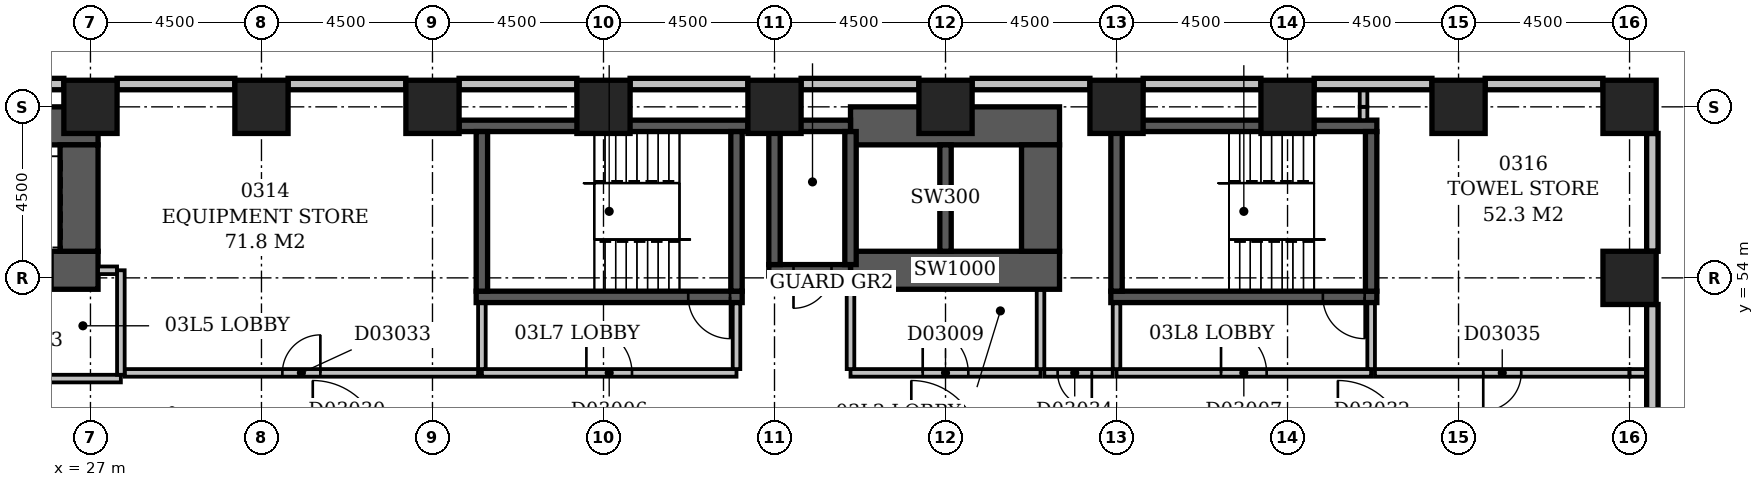
"""IFC4 building model, lengths in metres.
Left out: names, types, materials, properties, quantities, classifications, styles, units other than length and angle.
Written with IfcOpenShell. Run it as: python <this file> out.ifc"""

import sys

from ifc_helpers import new_model, si_unit, direction, frame, frame_2d, origin, origin_2d, place, context, subcontext, project, spatial, rectangle, extrude, element, fill, save


model = new_model("IFC4")
c1 = context("Model", 3, precision=1e-05, world=origin(), true_north=direction((0.0, 1.0)))
c2 = subcontext(c1, "Body", "Model", "MODEL_VIEW")
j1 = project(units=[si_unit("LENGTHUNIT", "METRE"), si_unit("PLANEANGLEUNIT", "RADIAN")], contexts=[c1])
p1 = place(None, origin())
s1 = spatial("IfcSite", under=j1, at=p1, CompositionType="ELEMENT")
p2 = place(p1, origin())
s2 = spatial("IfcBuilding", under=s1, at=p2, CompositionType="ELEMENT")
p3 = place(p2, frame((0.0, 0.0, 19.0)))
s3 = spatial("IfcBuildingStorey", under=s2, at=p3, CompositionType="ELEMENT", Elevation=19.0)
p4 = place(p3, frame((23.7, 54.2, -0.4), z_axis=(0.0, 0.0, 1.0), x_axis=(1.0, 0.0, 0.0)))
e1 = element("IfcWall", 1, at=p4, inside=s3, PredefinedType="SHEAR", context=c2, shape_type="SweptSolid", body=[
    extrude(rectangle(XDim=3.5, YDim=1.0, at=frame_2d((1.75, 0.0))), origin(), (0.0, 0.0, 1.0), 4.95),
])
p5 = place(p4, frame((1.2, 0.0, 0.4)))
e2 = element("IfcOpeningElement", 2, at=p5, cuts=e1, PredefinedType="OPENING", context=c2, shape_type="SweptSolid", body=[
    extrude(rectangle(XDim=1.1, YDim=2.1, at=frame_2d((0.55, 1.05))), frame((0.0, 0.512, 0.0), z_axis=(0.0, -1.0, 0.0), x_axis=(1.0, 0.0, 0.0)), (0.0, 0.0, 1.0), 1.024),
])
p6 = place(p3, frame((23.7, 58.0, -0.4), z_axis=(0.0, 0.0, 1.0), x_axis=(1.0, 0.0, 0.0)))
e3 = element("IfcWall", 3, at=p6, inside=s3, PredefinedType="SHEAR", context=c2, shape_type="SweptSolid", body=[
    extrude(rectangle(XDim=3.5, YDim=1.0, at=frame_2d((1.75, 0.0))), origin(), (0.0, 0.0, 1.0), 4.95),
])
p7 = place(p3, frame((26.7, 54.7, -0.4), z_axis=(0.0, 0.0, 1.0), x_axis=(0.0, 1.0, 0.0)))
e4 = element("IfcWall", 4, at=p7, inside=s3, PredefinedType="SHEAR", context=c2, shape_type="SweptSolid", body=[
    extrude(rectangle(XDim=2.8, YDim=1.0, at=frame_2d((1.4, 0.0))), origin(), (0.0, 0.0, 1.0), 4.95),
])
p8 = place(p3, frame((36.7, 58.0, -0.4), z_axis=(0.0, 0.0, 1.0), x_axis=(1.0, 0.0, 0.0)))
e5 = element("IfcWall", 5, at=p8, inside=s3, PredefinedType="SHEAR", context=c2, shape_type="SweptSolid", body=[
    extrude(rectangle(XDim=7.6, YDim=0.3, at=frame_2d((3.8, 0.0))), origin(), (0.0, 0.0, 1.0), 4.95),
])
p9 = place(p3, frame((37.15, 53.5, -0.4), z_axis=(0.0, 0.0, 1.0), x_axis=(1.0, 0.0, 0.0)))
e6 = element("IfcWall", 6, at=p9, inside=s3, PredefinedType="SHEAR", context=c2, shape_type="SweptSolid", body=[
    extrude(rectangle(XDim=7.0, YDim=0.3, at=frame_2d((3.5, 0.0))), origin(), (0.0, 0.0, 1.0), 4.95),
])
p10 = place(p9, frame((5.58, 0.0, 0.4)))
e7 = element("IfcOpeningElement", 7, at=p10, cuts=e6, PredefinedType="OPENING", context=c2, shape_type="SweptSolid", body=[
    extrude(rectangle(XDim=1.1, YDim=2.1, at=frame_2d((0.55, 1.05))), frame((0.0, 0.162, 0.0), z_axis=(0.0, -1.0, 0.0), x_axis=(1.0, 0.0, 0.0)), (0.0, 0.0, 1.0), 0.324),
])
for number, where, z_axis, x_axis in (
    (8, (37.3, 53.65, -0.4), (0.0, 0.0, 1.0), (0.0, 1.0, 0.0)),
    (9, (44.0, 53.65, -0.4), (0.0, 0.0, 1.0), (0.0, 1.0, 0.0)),
):
    element("IfcWall", number, at=place(p3, frame(where, z_axis=z_axis, x_axis=x_axis)), inside=s3, PredefinedType="SHEAR", context=c2, shape_type="SweptSolid", body=[
        extrude(rectangle(XDim=4.2, YDim=0.3, at=frame_2d((2.1, 0.0))), origin(), (0.0, 0.0, 1.0), 4.95),
    ])
p11 = place(p3, frame((44.85, 54.2, -0.4), z_axis=(0.0, 0.0, 1.0), x_axis=(1.0, 0.0, 0.0)))
e10 = element("IfcWall", 10, at=p11, inside=s3, PredefinedType="SHEAR", context=c2, shape_type="SweptSolid", body=[
    extrude(rectangle(XDim=2.15, YDim=0.3, at=frame_2d((1.075, 0.0))), origin(), (0.0, 0.0, 1.0), 4.95),
])
p12 = place(p11, frame((0.65, 0.0, 0.4)))
e11 = element("IfcOpeningElement", 11, at=p12, cuts=e10, PredefinedType="OPENING", context=c2, shape_type="SweptSolid", body=[
    extrude(rectangle(XDim=1.0, YDim=2.1, at=frame_2d((0.5, 1.05))), frame((0.0, 0.162, 0.0), z_axis=(0.0, -1.0, 0.0), x_axis=(1.0, 0.0, 0.0)), (0.0, 0.0, 1.0), 0.324),
])
p13 = place(p3, frame((44.85, 58.0, -0.4), z_axis=(0.0, 0.0, 1.0), x_axis=(1.0, 0.0, 0.0)))
e12 = element("IfcWall", 12, at=p13, inside=s3, PredefinedType="SHEAR", context=c2, shape_type="SweptSolid", body=[
    extrude(rectangle(XDim=2.15, YDim=0.3, at=frame_2d((1.075, 0.0))), origin(), (0.0, 0.0, 1.0), 4.95),
])
p14 = place(p3, frame((45.0, 54.35, -0.4), z_axis=(0.0, 0.0, 1.0), x_axis=(0.0, 1.0, 0.0)))
e13 = element("IfcWall", 13, at=p14, inside=s3, PredefinedType="SHEAR", context=c2, shape_type="SweptSolid", body=[
    extrude(rectangle(XDim=3.5, YDim=0.3, at=frame_2d((1.75, 0.0))), origin(), (0.0, 0.0, 1.0), 4.95),
])
p15 = place(p3, frame((47.0, 54.2, -0.4), z_axis=(0.0, 0.0, 1.0), x_axis=(1.0, 0.0, 0.0)))
e14 = element("IfcWall", 14, at=p15, inside=s3, PredefinedType="SHEAR", context=c2, shape_type="SweptSolid", body=[
    extrude(rectangle(XDim=5.5, YDim=1.0, at=frame_2d((2.75, 0.0))), origin(), (0.0, 0.0, 1.0), 4.95),
])
p16 = place(p3, frame((47.0, 54.35, -0.4), z_axis=(0.0, 0.0, 1.0), x_axis=(0.0, 1.0, 0.0)))
e15 = element("IfcWall", 15, at=p16, inside=s3, PredefinedType="SHEAR", context=c2, shape_type="SweptSolid", body=[
    extrude(rectangle(XDim=3.5, YDim=0.3, at=frame_2d((1.75, 0.0))), origin(), (0.0, 0.0, 1.0), 4.95),
])
p17 = place(p3, frame((47.0, 58.0, -0.4), z_axis=(0.0, 0.0, 1.0), x_axis=(1.0, 0.0, 0.0)))
e16 = element("IfcWall", 16, at=p17, inside=s3, PredefinedType="SHEAR", context=c2, shape_type="SweptSolid", body=[
    extrude(rectangle(XDim=5.5, YDim=1.0, at=frame_2d((2.75, 0.0))), origin(), (0.0, 0.0, 1.0), 4.95),
])
p18 = place(p3, frame((49.5, 54.7, -0.4), z_axis=(0.0, 0.0, 1.0), x_axis=(0.0, 1.0, 0.0)))
e17 = element("IfcWall", 17, at=p18, inside=s3, PredefinedType="SHEAR", context=c2, shape_type="SweptSolid", body=[
    extrude(rectangle(XDim=2.8, YDim=0.3, at=frame_2d((1.4, 0.0))), origin(), (0.0, 0.0, 1.0), 4.95),
])
p19 = place(p3, frame((52.0, 54.7, -0.4), z_axis=(0.0, 0.0, 1.0), x_axis=(0.0, 1.0, 0.0)))
e18 = element("IfcWall", 18, at=p19, inside=s3, PredefinedType="SHEAR", context=c2, shape_type="SweptSolid", body=[
    extrude(rectangle(XDim=2.8, YDim=1.0, at=frame_2d((1.4, 0.0))), origin(), (0.0, 0.0, 1.0), 4.95),
])
p20 = place(p3, frame((53.85, 53.5, -0.4), z_axis=(0.0, 0.0, 1.0), x_axis=(1.0, 0.0, 0.0)))
e19 = element("IfcWall", 19, at=p20, inside=s3, PredefinedType="SHEAR", context=c2, shape_type="SweptSolid", body=[
    extrude(rectangle(XDim=7.0, YDim=0.3, at=frame_2d((3.5, 0.0))), origin(), (0.0, 0.0, 1.0), 4.95),
])
p21 = place(p20, frame((5.58, 0.0, 0.4)))
e20 = element("IfcOpeningElement", 20, at=p21, cuts=e19, PredefinedType="OPENING", context=c2, shape_type="SweptSolid", body=[
    extrude(rectangle(XDim=1.1, YDim=2.1, at=frame_2d((0.55, 1.05))), frame((0.0, 0.162, 0.0), z_axis=(0.0, -1.0, 0.0), x_axis=(1.0, 0.0, 0.0)), (0.0, 0.0, 1.0), 0.324),
])
p22 = place(p3, frame((53.85, 58.0, -0.4), z_axis=(0.0, 0.0, 1.0), x_axis=(1.0, 0.0, 0.0)))
e21 = element("IfcWall", 21, at=p22, inside=s3, PredefinedType="SHEAR", context=c2, shape_type="SweptSolid", body=[
    extrude(rectangle(XDim=7.0, YDim=0.3, at=frame_2d((3.5, 0.0))), origin(), (0.0, 0.0, 1.0), 4.95),
])
for number, where, z_axis, x_axis in (
    (22, (54.0, 53.65, -0.4), (0.0, 0.0, 1.0), (0.0, 1.0, 0.0)),
    (23, (60.7, 53.65, -0.4), (0.0, 0.0, 1.0), (0.0, 1.0, 0.0)),
):
    element("IfcWall", number, at=place(p3, frame(where, z_axis=z_axis, x_axis=x_axis)), inside=s3, PredefinedType="SHEAR", context=c2, shape_type="SweptSolid", body=[
        extrude(rectangle(XDim=4.2, YDim=0.3, at=frame_2d((2.1, 0.0))), origin(), (0.0, 0.0, 1.0), 4.95),
    ])
for number, where, z_axis, x_axis in (
    (24, (67.5, 54.0, -0.4), (0.0, 0.0, 1.0), (1.0, 0.0, 0.0)),
    (25, (27.0, 58.5, -0.4), (0.0, 0.0, 1.0), (1.0, 0.0, 0.0)),
    (26, (31.5, 58.5, -0.4), (0.0, 0.0, 1.0), (1.0, 0.0, 0.0)),
    (27, (36.0, 58.5, -0.4), (0.0, 0.0, 1.0), (1.0, 0.0, 0.0)),
    (28, (40.5, 58.5, -0.4), (0.0, 0.0, 1.0), (1.0, 0.0, 0.0)),
    (29, (45.0, 58.5, -0.4), (0.0, 0.0, 1.0), (1.0, 0.0, 0.0)),
    (30, (49.5, 58.5, -0.4), (0.0, 0.0, 1.0), (1.0, 0.0, 0.0)),
    (31, (54.0, 58.5, -0.4), (0.0, 0.0, 1.0), (1.0, 0.0, 0.0)),
    (32, (58.5, 58.5, -0.4), (0.0, 0.0, 1.0), (1.0, 0.0, 0.0)),
    (33, (63.0, 58.5, -0.4), (0.0, 0.0, 1.0), (1.0, 0.0, 0.0)),
    (34, (67.5, 58.5, -0.4), (0.0, 0.0, 1.0), (1.0, 0.0, 0.0)),
):
    element("IfcColumn", number, at=place(p3, frame(where, z_axis=z_axis, x_axis=x_axis)), inside=s3, PredefinedType="COLUMN", context=c2, shape_type="SweptSolid", body=[
        extrude(rectangle(XDim=1.4, YDim=1.4, at=origin_2d()), origin(), (0.0, 0.0, 1.0), 4.95),
    ])
for number, where, z_axis, x_axis in (
    (35, (68.1, 50.2, 0.0), (0.0, 0.0, 1.0), (0.0, 1.0, 0.0)),
    (36, (68.1, 54.7, 0.0), (0.0, 0.0, 1.0), (0.0, 1.0, 0.0)),
    (37, (66.8, 59.1, 0.0), (0.0, 0.0, 1.0), (-1.0, 0.0, 0.0)),
    (38, (62.3, 59.1, 0.0), (0.0, 0.0, 1.0), (-1.0, 0.0, 0.0)),
    (39, (57.8, 59.1, 0.0), (0.0, 0.0, 1.0), (-1.0, 0.0, 0.0)),
    (40, (53.3, 59.1, 0.0), (0.0, 0.0, 1.0), (-1.0, 0.0, 0.0)),
    (41, (48.8, 59.1, 0.0), (0.0, 0.0, 1.0), (-1.0, 0.0, 0.0)),
    (42, (44.3, 59.1, 0.0), (0.0, 0.0, 1.0), (-1.0, 0.0, 0.0)),
    (43, (39.8, 59.1, 0.0), (0.0, 0.0, 1.0), (-1.0, 0.0, 0.0)),
    (44, (35.3, 59.1, 0.0), (0.0, 0.0, 1.0), (-1.0, 0.0, 0.0)),
    (45, (30.8, 59.1, 0.0), (0.0, 0.0, 1.0), (-1.0, 0.0, 0.0)),
    (46, (26.3, 59.1, 0.0), (0.0, 0.0, 1.0), (-1.0, 0.0, 0.0)),
):
    element("IfcWall", number, at=place(p3, frame(where, z_axis=z_axis, x_axis=x_axis)), inside=s3, PredefinedType="STANDARD", context=c2, shape_type="SweptSolid", body=[
        extrude(rectangle(XDim=3.1, YDim=0.3, at=frame_2d((1.55, 0.0))), origin(), (0.0, 0.0, 1.0), 3.9),
    ])
p23 = place(p3, frame((47.0, 51.5, 0.0), z_axis=(0.0, 0.0, 1.0), x_axis=(1.0, 0.0, 0.0)))
e47 = element("IfcWall", 47, at=p23, inside=s3, PredefinedType="PARTITIONING", context=c2, shape_type="SweptSolid", body=[
    extrude(rectangle(XDim=5.0, YDim=0.2, at=frame_2d((2.5, 0.0))), origin(), (0.0, 0.0, 1.0), 4.55),
])
p24 = place(p23, frame((1.9, 0.0, 0.0)))
e48 = element("IfcOpeningElement", 48, at=p24, cuts=e47, PredefinedType="OPENING", context=c2, shape_type="SweptSolid", body=[
    extrude(rectangle(XDim=1.2, YDim=2.1, at=frame_2d((0.6, 1.05))), frame((0.0, 0.112, 0.0), z_axis=(0.0, -1.0, 0.0), x_axis=(1.0, 0.0, 0.0)), (0.0, 0.0, 1.0), 0.224),
])
for number, where, z_axis, x_axis in (
    (49, (52.0, 51.6, 0.0), (0.0, 0.0, 1.0), (0.0, 1.0, 0.0)),
    (50, (47.0, 51.6, 0.0), (0.0, 0.0, 1.0), (0.0, 1.0, 0.0)),
):
    element("IfcWall", number, at=place(p3, frame(where, z_axis=z_axis, x_axis=x_axis)), inside=s3, PredefinedType="PARTITIONING", context=c2, shape_type="SweptSolid", body=[
        extrude(rectangle(XDim=2.08, YDim=0.2, at=frame_2d((1.04, 0.0))), origin(), (0.0, 0.0, 1.0), 4.55),
    ])
p25 = place(p3, frame((23.0, 51.35, 0.0), z_axis=(0.0, 0.0, 1.0), x_axis=(1.0, 0.0, 0.0)))
e51 = element("IfcWall", 51, at=p25, inside=s3, PredefinedType="PARTITIONING", context=c2, shape_type="SweptSolid", body=[
    extrude(rectangle(XDim=4.8, YDim=0.2, at=frame_2d((2.4, 0.0))), origin(), (0.0, 0.0, 1.0), 4.55),
])
p26 = place(p25, frame((1.65, 0.0, 0.0)))
e52 = element("IfcOpeningElement", 52, at=p26, cuts=e51, PredefinedType="OPENING", context=c2, shape_type="SweptSolid", body=[
    extrude(rectangle(XDim=1.2, YDim=2.1, at=frame_2d((0.6, 1.05))), frame((0.0, 0.112, 0.0), z_axis=(0.0, -1.0, 0.0), x_axis=(1.0, 0.0, 0.0)), (0.0, 0.0, 1.0), 0.224),
])
p27 = place(p3, frame((27.8, 51.45, 0.0), z_axis=(0.0, 0.0, 1.0), x_axis=(0.0, 1.0, 0.0)))
e53 = element("IfcWall", 53, at=p27, inside=s3, PredefinedType="PARTITIONING", context=c2, shape_type="SweptSolid", body=[
    extrude(rectangle(XDim=2.75, YDim=0.2, at=frame_2d((1.375, 0.0))), origin(), (0.0, 0.0, 1.0), 4.55),
])
p28 = place(p3, frame((27.2, 54.2, 0.0), z_axis=(0.0, 0.0, 1.0), x_axis=(1.0, 0.0, 0.0)))
e54 = element("IfcWall", 54, at=p28, inside=s3, PredefinedType="PARTITIONING", context=c2, shape_type="SweptSolid", body=[
    extrude(rectangle(XDim=0.5, YDim=0.2, at=frame_2d((0.25, 0.0))), origin(), (0.0, 0.0, 1.0), 4.55),
])
p29 = place(p3, frame((37.3, 51.5, 0.0), z_axis=(0.0, 0.0, 1.0), x_axis=(1.0, 0.0, 0.0)))
e55 = element("IfcWall", 55, at=p29, inside=s3, PredefinedType="PARTITIONING", context=c2, shape_type="SweptSolid", body=[
    extrude(rectangle(XDim=6.7, YDim=0.2, at=frame_2d((3.35, 0.0))), origin(), (0.0, 0.0, 1.0), 4.55),
])
p30 = place(p29, frame((2.75, 0.0, 0.0)))
e56 = element("IfcOpeningElement", 56, at=p30, cuts=e55, PredefinedType="OPENING", context=c2, shape_type="SweptSolid", body=[
    extrude(rectangle(XDim=1.2, YDim=2.1, at=frame_2d((0.6, 1.05))), frame((0.0, 0.112, 0.0), z_axis=(0.0, -1.0, 0.0), x_axis=(1.0, 0.0, 0.0)), (0.0, 0.0, 1.0), 0.224),
])
for number, where, z_axis, x_axis in (
    (57, (44.0, 51.6, 0.0), (0.0, 0.0, 1.0), (0.0, 1.0, 0.0)),
    (58, (37.3, 51.6, 0.0), (0.0, 0.0, 1.0), (0.0, 1.0, 0.0)),
):
    element("IfcWall", number, at=place(p3, frame(where, z_axis=z_axis, x_axis=x_axis)), inside=s3, PredefinedType="PARTITIONING", context=c2, shape_type="SweptSolid", body=[
        extrude(rectangle(XDim=1.73, YDim=0.2, at=frame_2d((0.865, 0.0))), origin(), (0.0, 0.0, 1.0), 4.55),
    ])
p31 = place(p3, frame((54.0, 51.5, 0.0), z_axis=(0.0, 0.0, 1.0), x_axis=(1.0, 0.0, 0.0)))
e59 = element("IfcWall", 59, at=p31, inside=s3, PredefinedType="PARTITIONING", context=c2, shape_type="SweptSolid", body=[
    extrude(rectangle(XDim=6.7, YDim=0.2, at=frame_2d((3.35, 0.0))), origin(), (0.0, 0.0, 1.0), 4.55),
])
p32 = place(p31, frame((2.75, 0.0, 0.0)))
e60 = element("IfcOpeningElement", 60, at=p32, cuts=e59, PredefinedType="OPENING", context=c2, shape_type="SweptSolid", body=[
    extrude(rectangle(XDim=1.2, YDim=2.1, at=frame_2d((0.6, 1.05))), frame((0.0, 0.112, 0.0), z_axis=(0.0, -1.0, 0.0), x_axis=(1.0, 0.0, 0.0)), (0.0, 0.0, 1.0), 0.224),
])
p33 = place(p3, frame((60.7, 51.6, 0.0), z_axis=(0.0, 0.0, 1.0), x_axis=(0.0, 1.0, 0.0)))
e61 = element("IfcWall", 61, at=p33, inside=s3, PredefinedType="PARTITIONING", context=c2, shape_type="SweptSolid", body=[
    extrude(rectangle(XDim=1.73, YDim=0.2, at=frame_2d((0.865, 0.0))), origin(), (0.0, 0.0, 1.0), 4.55),
])
p34 = place(p3, frame((54.0, 51.6, 0.0), z_axis=(0.0, 0.0, 1.0), x_axis=(0.0, 1.0, 0.0)))
e62 = element("IfcWall", 62, at=p34, inside=s3, PredefinedType="PARTITIONING", context=c2, shape_type="SweptSolid", body=[
    extrude(rectangle(XDim=1.73, YDim=0.2, at=frame_2d((0.865, 0.0))), origin(), (0.0, 0.0, 1.0), 3.85),
])
p35 = place(p3, frame((37.2, 51.5, 0.0), z_axis=(0.0, 0.0, 1.0), x_axis=(-1.0, 0.0, 0.0)))
e63 = element("IfcWall", 63, at=p35, inside=s3, PredefinedType="PARTITIONING", context=c2, shape_type="SweptSolid", body=[
    extrude(rectangle(XDim=9.3, YDim=0.2, at=frame_2d((4.65, 0.0))), origin(), (0.0, 0.0, 1.0), 4.55),
])
p36 = place(p35, frame((4.15, 0.0, 0.0)))
e64 = element("IfcOpeningElement", 64, at=p36, cuts=e63, PredefinedType="OPENING", context=c2, shape_type="SweptSolid", body=[
    extrude(rectangle(XDim=1.0, YDim=2.1, at=frame_2d((0.5, 1.05))), frame((0.0, 0.112, 0.0), z_axis=(0.0, -1.0, 0.0), x_axis=(1.0, 0.0, 0.0)), (0.0, 0.0, 1.0), 0.224),
])
p37 = place(p3, frame((53.9, 51.5, 0.0), z_axis=(0.0, 0.0, 1.0), x_axis=(-1.0, 0.0, 0.0)))
e65 = element("IfcWall", 65, at=p37, inside=s3, PredefinedType="PARTITIONING", context=c2, shape_type="SweptSolid", body=[
    extrude(rectangle(XDim=1.8, YDim=0.2, at=frame_2d((0.9, 0.0))), origin(), (0.0, 0.0, 1.0), 4.55),
])
p38 = place(p37, frame((0.55, 0.0, 0.0)))
e66 = element("IfcOpeningElement", 66, at=p38, cuts=e65, PredefinedType="OPENING", context=c2, shape_type="SweptSolid", body=[
    extrude(rectangle(XDim=0.9, YDim=2.1, at=frame_2d((0.45, 1.05))), frame((0.0, 0.112, 0.0), z_axis=(0.0, -1.0, 0.0), x_axis=(1.0, 0.0, 0.0)), (0.0, 0.0, 1.0), 0.224),
])
p39 = place(p3, frame((67.5, 51.5, 0.0), z_axis=(0.0, 0.0, 1.0), x_axis=(-1.0, 0.0, 0.0)))
e67 = element("IfcWall", 67, at=p39, inside=s3, PredefinedType="PARTITIONING", context=c2, shape_type="SweptSolid", body=[
    extrude(rectangle(XDim=6.7, YDim=0.2, at=frame_2d((3.35, 0.0))), origin(), (0.0, 0.0, 1.0), 4.55),
])
p40 = place(p39, frame((2.85, 0.0, 0.0)))
e68 = element("IfcOpeningElement", 68, at=p40, cuts=e67, PredefinedType="OPENING", context=c2, shape_type="SweptSolid", body=[
    extrude(rectangle(XDim=1.0, YDim=2.1, at=frame_2d((0.5, 1.05))), frame((0.0, 0.112, 0.0), z_axis=(0.0, -1.0, 0.0), x_axis=(1.0, 0.0, 0.0)), (0.0, 0.0, 1.0), 0.224),
])
p41 = place(p3, frame((67.95, 51.5, 0.0), z_axis=(0.0, 0.0, 1.0), x_axis=(-1.0, 0.0, 0.0)))
e69 = element("IfcWall", 69, at=p41, inside=s3, PredefinedType="PARTITIONING", context=c2, shape_type="SweptSolid", body=[
    extrude(rectangle(XDim=0.45, YDim=0.2, at=frame_2d((0.225, 0.0))), origin(), (0.0, 0.0, 1.0), 4.55),
])
p42 = place(p3, frame((60.5, 58.5, 0.0), z_axis=(0.0, 0.0, 1.0), x_axis=(0.0, -1.0, 0.0)))
e70 = element("IfcWall", 70, at=p42, inside=s3, PredefinedType="PARTITIONING", context=c2, shape_type="SweptSolid", body=[
    extrude(rectangle(XDim=0.35, YDim=0.2, at=frame_2d((0.175, 0.0))), origin(), (0.0, 0.0, 1.0), 4.55),
])
p43 = place(p3, frame((60.5, 58.95, 0.0), z_axis=(0.0, 0.0, 1.0), x_axis=(0.0, -1.0, 0.0)))
e71 = element("IfcWall", 71, at=p43, inside=s3, PredefinedType="PARTITIONING", context=c2, shape_type="SweptSolid", body=[
    extrude(rectangle(XDim=0.45, YDim=0.2, at=frame_2d((0.225, 0.0))), origin(), (0.0, 0.0, 1.0), 4.55),
])
p44 = place(p30, origin())
e72 = element("IfcDoor", 72, at=p44, inside=s3, OperationType="SINGLE_SWING_LEFT", PredefinedType="DOOR", context=c2, shape_type="SweptSolid", body=[
    extrude(rectangle(XDim=1.2, YDim=2.1, at=frame_2d((0.6, 1.05))), frame((0.0, 0.025, 0.0), z_axis=(0.0, -1.0, 0.0), x_axis=(1.0, 0.0, 0.0)), (0.0, 0.0, 1.0), 0.05),
])
fill(e56, e72)
p45 = place(p32, origin())
e73 = element("IfcDoor", 73, at=p45, inside=s3, OperationType="SINGLE_SWING_LEFT", PredefinedType="DOOR", context=c2, shape_type="SweptSolid", body=[
    extrude(rectangle(XDim=1.2, YDim=2.1, at=frame_2d((0.6, 1.05))), frame((0.0, 0.025, 0.0), z_axis=(0.0, -1.0, 0.0), x_axis=(1.0, 0.0, 0.0)), (0.0, 0.0, 1.0), 0.05),
])
fill(e60, e73)
p46 = place(p24, origin())
e74 = element("IfcDoor", 74, at=p46, inside=s3, OperationType="SINGLE_SWING_LEFT", PredefinedType="DOOR", context=c2, shape_type="SweptSolid", body=[
    extrude(rectangle(XDim=1.2, YDim=2.1, at=frame_2d((0.6, 1.05))), frame((0.0, 0.025, 0.0), z_axis=(0.0, -1.0, 0.0), x_axis=(1.0, 0.0, 0.0)), (0.0, 0.0, 1.0), 0.05),
])
fill(e48, e74)
p47 = place(p12, frame((1.0, 0.0, 0.0), z_axis=(0.0, 0.0, 1.0), x_axis=(-1.0, 0.0, 0.0)))
e75 = element("IfcDoor", 75, at=p47, inside=s3, OperationType="SINGLE_SWING_RIGHT", PredefinedType="DOOR", context=c2, shape_type="SweptSolid", body=[
    extrude(rectangle(XDim=1.0, YDim=2.1, at=frame_2d((0.5, 1.05))), frame((0.0, 0.025, 0.0), z_axis=(0.0, -1.0, 0.0), x_axis=(1.0, 0.0, 0.0)), (0.0, 0.0, 1.0), 0.05),
])
fill(e11, e75)
p48 = place(p10, origin())
e76 = element("IfcDoor", 76, at=p48, inside=s3, OperationType="SINGLE_SWING_RIGHT", PredefinedType="DOOR", context=c2, shape_type="SweptSolid", body=[
    extrude(rectangle(XDim=1.1, YDim=2.1, at=frame_2d((0.55, 1.05))), frame((0.0, 0.025, 0.0), z_axis=(0.0, -1.0, 0.0), x_axis=(1.0, 0.0, 0.0)), (0.0, 0.0, 1.0), 0.05),
])
fill(e7, e76)
p49 = place(p21, origin())
e77 = element("IfcDoor", 77, at=p49, inside=s3, OperationType="SINGLE_SWING_RIGHT", PredefinedType="DOOR", context=c2, shape_type="SweptSolid", body=[
    extrude(rectangle(XDim=1.1, YDim=2.1, at=frame_2d((0.55, 1.05))), frame((0.0, 0.025, 0.0), z_axis=(0.0, -1.0, 0.0), x_axis=(1.0, 0.0, 0.0)), (0.0, 0.0, 1.0), 0.05),
])
fill(e20, e77)
p50 = place(p36, frame((1.0, 0.0, 0.0), z_axis=(0.0, 0.0, 1.0), x_axis=(-1.0, 0.0, 0.0)))
e78 = element("IfcDoor", 78, at=p50, inside=s3, OperationType="SINGLE_SWING_RIGHT", PredefinedType="DOOR", context=c2, shape_type="SweptSolid", body=[
    extrude(rectangle(XDim=1.0, YDim=2.1, at=frame_2d((0.5, 1.05))), frame((0.0, 0.025, 0.0), z_axis=(0.0, -1.0, 0.0), x_axis=(1.0, 0.0, 0.0)), (0.0, 0.0, 1.0), 0.05),
])
fill(e64, e78)
p51 = place(p38, origin())
e79 = element("IfcDoor", 79, at=p51, inside=s3, OperationType="SINGLE_SWING_LEFT", PredefinedType="DOOR", context=c2, shape_type="SweptSolid", body=[
    extrude(rectangle(XDim=0.9, YDim=2.1, at=frame_2d((0.45, 1.05))), frame((0.0, 0.025, 0.0), z_axis=(0.0, -1.0, 0.0), x_axis=(1.0, 0.0, 0.0)), (0.0, 0.0, 1.0), 0.05),
])
fill(e66, e79)
p52 = place(p40, frame((1.0, 0.0, 0.0), z_axis=(0.0, 0.0, 1.0), x_axis=(-1.0, 0.0, 0.0)))
e80 = element("IfcDoor", 80, at=p52, inside=s3, OperationType="SINGLE_SWING_LEFT", PredefinedType="DOOR", context=c2, shape_type="SweptSolid", body=[
    extrude(rectangle(XDim=1.0, YDim=2.1, at=frame_2d((0.5, 1.05))), frame((0.0, 0.025, 0.0), z_axis=(0.0, -1.0, 0.0), x_axis=(1.0, 0.0, 0.0)), (0.0, 0.0, 1.0), 0.05),
])
fill(e68, e80)
save(model, sys.argv[1])
